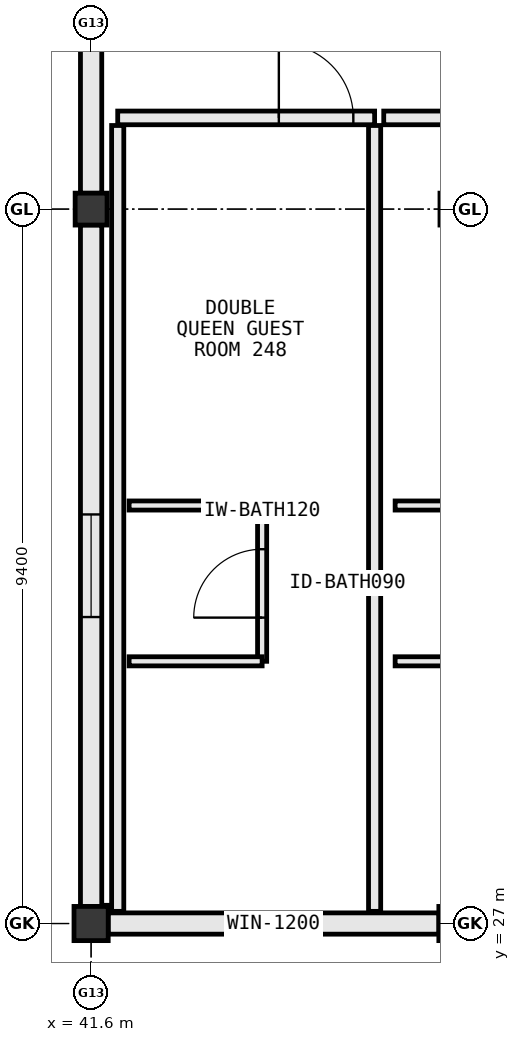
"""IFC4 building model, lengths in metres.
Left out: names, types, materials, properties, quantities, classifications, styles, units other than length and angle.
Written with IfcOpenShell. Run it as: python <this file> out.ifc"""

import sys

from ifc_helpers import new_model, si_unit, direction, frame, frame_2d, origin, origin_2d, place, context, subcontext, project, spatial, rectangle, extrude, element, fill, save


model = new_model("IFC4")
c1 = context("Model", 3, precision=1e-05, world=origin(), true_north=direction((0.0, 1.0)))
c2 = subcontext(c1, "Body", "Model", "MODEL_VIEW")
j1 = project(units=[si_unit("LENGTHUNIT", "METRE"), si_unit("PLANEANGLEUNIT", "RADIAN")], contexts=[c1])
p1 = place(None, origin())
s1 = spatial("IfcSite", under=j1, at=p1, CompositionType="ELEMENT")
p2 = place(p1, origin())
s2 = spatial("IfcBuilding", under=s1, at=p2, CompositionType="ELEMENT")
p3 = place(p2, frame((0.0, 0.0, 35.2)))
s3 = spatial("IfcBuildingStorey", under=s2, at=p3, CompositionType="ELEMENT", Elevation=35.2)
p4 = place(p3, frame((41.6, 27.0, 0.0), z_axis=(0.0, 0.0, 1.0), x_axis=(1.0, 0.0, 0.0)))
e1 = element("IfcColumn", 1, at=p4, inside=s3, PredefinedType="COLUMN", context=c2, shape_type="SweptSolid", body=[
    extrude(rectangle(XDim=0.45, YDim=0.45, at=origin_2d()), origin(), (0.0, 0.0, 1.0), 3.565),
])
p5 = place(p3, frame((41.6, 36.4, 0.0), z_axis=(0.0, 0.0, 1.0), x_axis=(1.0, 0.0, 0.0)))
e2 = element("IfcColumn", 2, at=p5, inside=s3, PredefinedType="COLUMN", context=c2, shape_type="SweptSolid", body=[
    extrude(rectangle(XDim=0.42, YDim=0.42, at=origin_2d()), origin(), (0.0, 0.0, 1.0), 3.565),
])
p6 = place(p3, frame((46.4, 27.0, 0.0), z_axis=(0.0, 0.0, 1.0), x_axis=(1.0, 0.0, 0.0)))
e3 = element("IfcColumn", 3, at=p6, inside=s3, PredefinedType="COLUMN", context=c2, shape_type="SweptSolid", body=[
    extrude(rectangle(XDim=0.45, YDim=0.45, at=origin_2d()), origin(), (0.0, 0.0, 1.0), 3.8),
])
p7 = place(p3, frame((41.6, 46.992, 0.0), z_axis=(0.0, 0.0, 1.0), x_axis=(0.0, -1.0, 0.0)))
e4 = element("IfcWall", 4, at=p7, inside=s3, PredefinedType="STANDARD", context=c2, shape_type="SweptSolid", body=[
    extrude(rectangle(XDim=10.384, YDim=0.28, at=frame_2d((5.192, 0.0))), origin(), (0.0, 0.0, 1.0), 2.92),
])
p8 = place(p7, frame((1.921, 0.0, 0.85)))
e5 = element("IfcOpeningElement", 5, at=p8, cuts=e4, PredefinedType="OPENING", context=c2, shape_type="SweptSolid", body=[
    extrude(rectangle(XDim=1.35, YDim=1.65, at=frame_2d((0.675, 0.825))), frame((0.0, 0.152, 0.0), z_axis=(0.0, -1.0, 0.0), x_axis=(1.0, 0.0, 0.0)), (0.0, 0.0, 1.0), 0.304),
])
p9 = place(p7, frame((7.113, 0.0, 0.85)))
e6 = element("IfcOpeningElement", 6, at=p9, cuts=e4, PredefinedType="OPENING", context=c2, shape_type="SweptSolid", body=[
    extrude(rectangle(XDim=1.35, YDim=1.65, at=frame_2d((0.675, 0.825))), frame((0.0, 0.152, 0.0), z_axis=(0.0, -1.0, 0.0), x_axis=(1.0, 0.0, 0.0)), (0.0, 0.0, 1.0), 0.304),
])
p10 = place(p3, frame((41.6, 36.192, 0.0), z_axis=(0.0, 0.0, 1.0), x_axis=(0.0, -1.0, 0.0)))
e7 = element("IfcWall", 7, at=p10, inside=s3, PredefinedType="STANDARD", context=c2, shape_type="SweptSolid", body=[
    extrude(rectangle(XDim=8.969, YDim=0.28, at=frame_2d((4.484, 0.0))), origin(), (0.0, 0.0, 1.0), 2.94),
])
p11 = place(p10, frame((3.81, 0.0, 0.85)))
e8 = element("IfcOpeningElement", 8, at=p11, cuts=e7, PredefinedType="OPENING", context=c2, shape_type="SweptSolid", body=[
    extrude(rectangle(XDim=1.35, YDim=1.65, at=frame_2d((0.675, 0.825))), frame((0.0, 0.152, 0.0), z_axis=(0.0, -1.0, 0.0), x_axis=(1.0, 0.0, 0.0)), (0.0, 0.0, 1.0), 0.304),
])
p12 = place(p3, frame((41.823, 27.0, 0.0), z_axis=(0.0, 0.0, 1.0), x_axis=(1.0, 0.0, 0.0)))
e9 = element("IfcWall", 9, at=p12, inside=s3, PredefinedType="STANDARD", context=c2, shape_type="SweptSolid", body=[
    extrude(rectangle(XDim=4.354, YDim=0.28, at=frame_2d((2.177, 0.0))), origin(), (0.0, 0.0, 1.0), 3.02),
])
p13 = place(p12, frame((1.577, 0.0, 0.85)))
e10 = element("IfcOpeningElement", 10, at=p13, cuts=e9, PredefinedType="OPENING", context=c2, shape_type="SweptSolid", body=[
    extrude(rectangle(XDim=1.2, YDim=1.55, at=frame_2d((0.6, 0.775))), frame((0.0, 0.152, 0.0), z_axis=(0.0, -1.0, 0.0), x_axis=(1.0, 0.0, 0.0)), (0.0, 0.0, 1.0), 0.304),
])
p14 = place(p3, frame((45.33, 37.6, 0.0), z_axis=(0.0, 0.0, 1.0), x_axis=(-1.0, 0.0, 0.0)))
e11 = element("IfcWall", 11, at=p14, inside=s3, PredefinedType="PARTITIONING", context=c2, shape_type="SweptSolid", body=[
    extrude(rectangle(XDim=3.38, YDim=0.18, at=frame_2d((1.69, 0.0))), origin(), (0.0, 0.0, 1.0), 3.565),
])
p15 = place(p14, frame((0.28, 0.0, 0.0)))
e12 = element("IfcOpeningElement", 12, at=p15, cuts=e11, PredefinedType="OPENING", context=c2, shape_type="SweptSolid", body=[
    extrude(rectangle(XDim=0.98, YDim=2.18, at=frame_2d((0.49, 1.09))), frame((0.0, 0.102, 0.0), z_axis=(0.0, -1.0, 0.0), x_axis=(1.0, 0.0, 0.0)), (0.0, 0.0, 1.0), 0.204),
])
p16 = place(p3, frame((41.95, 27.16, 0.0), z_axis=(0.0, 0.0, 1.0), x_axis=(0.0, 1.0, 0.0)))
e13 = element("IfcWall", 13, at=p16, inside=s3, PredefinedType="PARTITIONING", context=c2, shape_type="SweptSolid", body=[
    extrude(rectangle(XDim=10.34, YDim=0.16, at=frame_2d((5.17, 0.0))), origin(), (0.0, 0.0, 1.0), 2.92),
])
p17 = place(p3, frame((45.33, 27.16, 0.0), z_axis=(0.0, 0.0, 1.0), x_axis=(0.0, 1.0, 0.0)))
e14 = element("IfcWall", 14, at=p17, inside=s3, PredefinedType="PARTITIONING", context=c2, shape_type="SweptSolid", body=[
    extrude(rectangle(XDim=10.34, YDim=0.16, at=frame_2d((5.17, 0.0))), origin(), (0.0, 0.0, 1.0), 3.565),
])
p18 = place(p3, frame((42.1, 32.5, 0.0), z_axis=(0.0, 0.0, 1.0), x_axis=(1.0, 0.0, 0.0)))
e15 = element("IfcWall", 15, at=p18, inside=s3, PredefinedType="PARTITIONING", context=c2, shape_type="SweptSolid", body=[
    extrude(rectangle(XDim=1.75, YDim=0.12, at=frame_2d((0.875, 0.0))), origin(), (0.0, 0.0, 1.0), 3.565),
])
p19 = place(p3, frame((43.85, 30.45, 0.0), z_axis=(0.0, 0.0, 1.0), x_axis=(0.0, 1.0, 0.0)))
e16 = element("IfcWall", 16, at=p19, inside=s3, PredefinedType="PARTITIONING", context=c2, shape_type="SweptSolid", body=[
    extrude(rectangle(XDim=2.05, YDim=0.12, at=frame_2d((1.025, 0.0))), origin(), (0.0, 0.0, 1.0), 3.11),
])
p20 = place(p19, frame((0.575, 0.0, 0.0)))
e17 = element("IfcOpeningElement", 17, at=p20, cuts=e16, PredefinedType="OPENING", context=c2, shape_type="SweptSolid", body=[
    extrude(rectangle(XDim=0.9, YDim=2.15, at=frame_2d((0.45, 1.075))), frame((0.0, 0.072, 0.0), z_axis=(0.0, -1.0, 0.0), x_axis=(1.0, 0.0, 0.0)), (0.0, 0.0, 1.0), 0.144),
])
p21 = place(p3, frame((42.1, 30.45, 0.0), z_axis=(0.0, 0.0, 1.0), x_axis=(1.0, 0.0, 0.0)))
e18 = element("IfcWall", 18, at=p21, inside=s3, PredefinedType="PARTITIONING", context=c2, shape_type="SweptSolid", body=[
    extrude(rectangle(XDim=1.75, YDim=0.12, at=frame_2d((0.875, 0.0))), origin(), (0.0, 0.0, 1.0), 3.565),
])
p22 = place(p3, frame((48.83, 37.6, 0.0), z_axis=(0.0, 0.0, 1.0), x_axis=(-1.0, 0.0, 0.0)))
e19 = element("IfcWall", 19, at=p22, inside=s3, PredefinedType="PARTITIONING", context=c2, shape_type="SweptSolid", body=[
    extrude(rectangle(XDim=3.38, YDim=0.18, at=frame_2d((1.69, 0.0))), origin(), (0.0, 0.0, 1.0), 3.565),
])
p23 = place(p22, frame((0.28, 0.0, 0.0)))
e20 = element("IfcOpeningElement", 20, at=p23, cuts=e19, PredefinedType="OPENING", context=c2, shape_type="SweptSolid", body=[
    extrude(rectangle(XDim=0.98, YDim=2.18, at=frame_2d((0.49, 1.09))), frame((0.0, 0.102, 0.0), z_axis=(0.0, -1.0, 0.0), x_axis=(1.0, 0.0, 0.0)), (0.0, 0.0, 1.0), 0.204),
])
for number, where, z_axis, x_axis in (
    (21, (45.6, 32.5, 0.0), (0.0, 0.0, 1.0), (1.0, 0.0, 0.0)),
    (22, (45.6, 30.45, 0.0), (0.0, 0.0, 1.0), (1.0, 0.0, 0.0)),
):
    element("IfcWall", number, at=place(p3, frame(where, z_axis=z_axis, x_axis=x_axis)), inside=s3, PredefinedType="PARTITIONING", context=c2, shape_type="SweptSolid", body=[
        extrude(rectangle(XDim=1.75, YDim=0.12, at=frame_2d((0.875, 0.0))), origin(), (0.0, 0.0, 1.0), 3.565),
    ])
p24 = place(p11, origin())
e23 = element("IfcWindow", 23, at=p24, inside=s3, PartitioningType="SINGLE_PANEL", PredefinedType="WINDOW", context=c2, shape_type="SweptSolid", body=[
    extrude(rectangle(XDim=1.35, YDim=1.65, at=frame_2d((0.675, 0.825))), frame((0.0, 0.03, 0.0), z_axis=(0.0, -1.0, 0.0), x_axis=(1.0, 0.0, 0.0)), (0.0, 0.0, 1.0), 0.06),
])
fill(e8, e23)
p25 = place(p13, origin())
e24 = element("IfcWindow", 24, at=p25, inside=s3, PartitioningType="SINGLE_PANEL", PredefinedType="WINDOW", context=c2, shape_type="SweptSolid", body=[
    extrude(rectangle(XDim=1.2, YDim=1.55, at=frame_2d((0.6, 0.775))), frame((0.0, 0.03, 0.0), z_axis=(0.0, -1.0, 0.0), x_axis=(1.0, 0.0, 0.0)), (0.0, 0.0, 1.0), 0.06),
])
fill(e10, e24)
p26 = place(p15, frame((0.98, 0.0, 0.0), z_axis=(0.0, 0.0, 1.0), x_axis=(-1.0, 0.0, 0.0)))
e25 = element("IfcDoor", 25, at=p26, inside=s3, OperationType="SINGLE_SWING_RIGHT", PredefinedType="DOOR", context=c2, shape_type="SweptSolid", body=[
    extrude(rectangle(XDim=0.98, YDim=2.18, at=frame_2d((0.49, 1.09))), frame((0.0, 0.025, 0.0), z_axis=(0.0, -1.0, 0.0), x_axis=(1.0, 0.0, 0.0)), (0.0, 0.0, 1.0), 0.05),
])
fill(e12, e25)
p27 = place(p20, origin())
e26 = element("IfcDoor", 26, at=p27, inside=s3, OperationType="SINGLE_SWING_LEFT", PredefinedType="DOOR", context=c2, shape_type="SweptSolid", body=[
    extrude(rectangle(XDim=0.9, YDim=2.15, at=frame_2d((0.45, 1.075))), frame((0.0, 0.025, 0.0), z_axis=(0.0, -1.0, 0.0), x_axis=(1.0, 0.0, 0.0)), (0.0, 0.0, 1.0), 0.05),
])
fill(e17, e26)
save(model, sys.argv[1])
